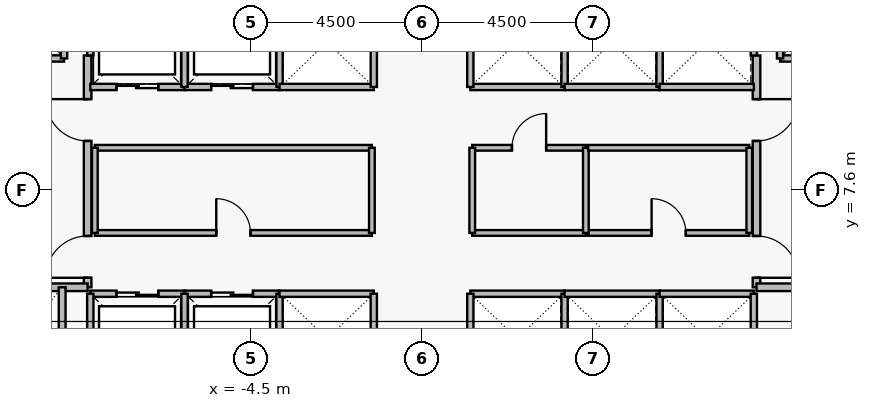
"""IFC4 building model, lengths in metres.
Left out: names, types, materials, properties, quantities, classifications, styles, units other than length and angle.
Written with IfcOpenShell. Run it as: python <this file> out.ifc"""

import sys

from ifc_helpers import new_model, si_unit, direction, frame, frame_2d, origin, place, context, subcontext, project, spatial, rectangle, extrude, element, fill, save


model = new_model("IFC4")
c1 = context("Model", 3, precision=1e-05, world=origin(), true_north=direction((0.0, 1.0)))
c2 = subcontext(c1, "Body", "Model", "MODEL_VIEW")
j1 = project(units=[si_unit("LENGTHUNIT", "METRE"), si_unit("PLANEANGLEUNIT", "RADIAN")], contexts=[c1])
p1 = place(None, origin())
s1 = spatial("IfcSite", under=j1, at=p1, CompositionType="ELEMENT")
p2 = place(p1, origin())
s2 = spatial("IfcBuilding", under=s1, at=p2, CompositionType="ELEMENT")
p3 = place(p2, frame((0.0, 0.0, 121.2)))
s3 = spatial("IfcBuildingStorey", under=s2, at=p3, CompositionType="ELEMENT", Elevation=121.2)
p4 = place(p3, frame((-8.8, 5.05, 0.0), z_axis=(0.0, 0.0, 1.0), x_axis=(0.0, 1.0, 0.0)))
e1 = element("IfcWall", 1, at=p4, inside=s3, PredefinedType="PARTITIONING", context=c2, shape_type="SweptSolid", body=[
    extrude(rectangle(XDim=6.1, YDim=0.2, at=frame_2d((3.05, 0.0))), origin(), (0.0, 0.0, 1.0), 3.43),
])
p5 = place(p4, frame((0.25, 0.0, 0.0)))
e2 = element("IfcOpeningElement", 2, at=p5, cuts=e1, PredefinedType="OPENING", context=c2, shape_type="SweptSolid", body=[
    extrude(rectangle(XDim=1.1, YDim=2.2, at=frame_2d((0.55, 1.1))), frame((0.0, 0.11, 0.0), z_axis=(0.0, -1.0, 0.0), x_axis=(1.0, 0.0, 0.0)), (0.0, 0.0, 1.0), 0.22),
])
p6 = place(p4, frame((3.85, 0.0, 0.0)))
e3 = element("IfcOpeningElement", 3, at=p6, cuts=e1, PredefinedType="OPENING", context=c2, shape_type="SweptSolid", body=[
    extrude(rectangle(XDim=1.1, YDim=2.2, at=frame_2d((0.55, 1.1))), frame((0.0, 0.11, 0.0), z_axis=(0.0, -1.0, 0.0), x_axis=(1.0, 0.0, 0.0)), (0.0, 0.0, 1.0), 0.22),
])
p7 = place(p3, frame((8.8, 11.15, 0.0), z_axis=(0.0, 0.0, 1.0), x_axis=(0.0, -1.0, 0.0)))
e4 = element("IfcWall", 4, at=p7, inside=s3, PredefinedType="PARTITIONING", context=c2, shape_type="SweptSolid", body=[
    extrude(rectangle(XDim=6.1, YDim=0.2, at=frame_2d((3.05, 0.0))), origin(), (0.0, 0.0, 1.0), 3.43),
])
p8 = place(p7, frame((1.15, 0.0, 0.0)))
e5 = element("IfcOpeningElement", 5, at=p8, cuts=e4, PredefinedType="OPENING", context=c2, shape_type="SweptSolid", body=[
    extrude(rectangle(XDim=1.1, YDim=2.2, at=frame_2d((0.55, 1.1))), frame((0.0, 0.11, 0.0), z_axis=(0.0, -1.0, 0.0), x_axis=(1.0, 0.0, 0.0)), (0.0, 0.0, 1.0), 0.22),
])
p9 = place(p7, frame((4.75, 0.0, 0.0)))
e6 = element("IfcOpeningElement", 6, at=p9, cuts=e4, PredefinedType="OPENING", context=c2, shape_type="SweptSolid", body=[
    extrude(rectangle(XDim=1.1, YDim=2.2, at=frame_2d((0.55, 1.1))), frame((0.0, 0.11, 0.0), z_axis=(0.0, -1.0, 0.0), x_axis=(1.0, 0.0, 0.0)), (0.0, 0.0, 1.0), 0.22),
])
p10 = place(p3, frame((-11.58, 11.07, 0.0), z_axis=(0.0, 0.0, 1.0), x_axis=(1.0, 0.0, 0.0)))
e7 = element("IfcWall", 7, at=p10, inside=s3, PredefinedType="PARTITIONING", context=c2, shape_type="SweptSolid", body=[
    extrude(rectangle(XDim=2.16, YDim=0.165, at=frame_2d((1.08, 0.0))), origin(), (0.0, 0.0, 1.0), 3.43),
])
p11 = place(p10, frame((0.53, 0.0, 0.0)))
e8 = element("IfcOpeningElement", 8, at=p11, cuts=e7, PredefinedType="OPENING", context=c2, shape_type="SweptSolid", body=[
    extrude(rectangle(XDim=1.15, YDim=2.25, at=frame_2d((0.575, 1.125))), frame((0.0, 0.093, 0.0), z_axis=(0.0, -1.0, 0.0), x_axis=(1.0, 0.0, 0.0)), (0.0, 0.0, 1.0), 0.185),
])
p12 = place(p3, frame((9.42, 11.07, 0.0), z_axis=(0.0, 0.0, 1.0), x_axis=(1.0, 0.0, 0.0)))
e9 = element("IfcWall", 9, at=p12, inside=s3, PredefinedType="PARTITIONING", context=c2, shape_type="SweptSolid", body=[
    extrude(rectangle(XDim=2.16, YDim=0.165, at=frame_2d((1.08, 0.0))), origin(), (0.0, 0.0, 1.0), 3.43),
])
p13 = place(p12, frame((0.53, 0.0, 0.0)))
e10 = element("IfcOpeningElement", 10, at=p13, cuts=e9, PredefinedType="OPENING", context=c2, shape_type="SweptSolid", body=[
    extrude(rectangle(XDim=1.15, YDim=2.25, at=frame_2d((0.575, 1.125))), frame((0.0, 0.093, 0.0), z_axis=(0.0, -1.0, 0.0), x_axis=(1.0, 0.0, 0.0)), (0.0, 0.0, 1.0), 0.185),
])
p14 = place(p3, frame((-8.73, 4.88, 0.0), z_axis=(0.0, 0.0, 1.0), x_axis=(1.0, 0.0, 0.0)))
e11 = element("IfcWall", 11, at=p14, inside=s3, PredefinedType="PARTITIONING", context=c2, shape_type="SweptSolid", body=[
    extrude(rectangle(XDim=2.48, YDim=0.165, at=frame_2d((1.24, 0.0))), origin(), (0.0, 0.0, 1.0), 3.43),
])
p15 = place(p14, frame((0.69, 0.0, 0.0)))
e12 = element("IfcOpeningElement", 12, at=p15, cuts=e11, PredefinedType="OPENING", context=c2, shape_type="SweptSolid", body=[
    extrude(rectangle(XDim=1.1, YDim=2.25, at=frame_2d((0.55, 1.125))), frame((0.0, 0.093, 0.0), z_axis=(0.0, -1.0, 0.0), x_axis=(1.0, 0.0, 0.0)), (0.0, 0.0, 1.0), 0.185),
])
p16 = place(p3, frame((-6.25, 4.88, 0.0), z_axis=(0.0, 0.0, 1.0), x_axis=(1.0, 0.0, 0.0)))
e13 = element("IfcWall", 13, at=p16, inside=s3, PredefinedType="PARTITIONING", context=c2, shape_type="SweptSolid", body=[
    extrude(rectangle(XDim=2.5, YDim=0.165, at=frame_2d((1.25, 0.0))), origin(), (0.0, 0.0, 1.0), 3.43),
])
p17 = place(p16, frame((0.7, 0.0, 0.0)))
e14 = element("IfcOpeningElement", 14, at=p17, cuts=e13, PredefinedType="OPENING", context=c2, shape_type="SweptSolid", body=[
    extrude(rectangle(XDim=1.1, YDim=2.25, at=frame_2d((0.55, 1.125))), frame((0.0, 0.093, 0.0), z_axis=(0.0, -1.0, 0.0), x_axis=(1.0, 0.0, 0.0)), (0.0, 0.0, 1.0), 0.185),
])
p18 = place(p3, frame((-8.73, 10.32, 0.0), z_axis=(0.0, 0.0, 1.0), x_axis=(1.0, 0.0, 0.0)))
e15 = element("IfcWall", 15, at=p18, inside=s3, PredefinedType="PARTITIONING", context=c2, shape_type="SweptSolid", body=[
    extrude(rectangle(XDim=2.48, YDim=0.165, at=frame_2d((1.24, 0.0))), origin(), (0.0, 0.0, 1.0), 3.43),
])
p19 = place(p18, frame((0.69, 0.0, 0.0)))
e16 = element("IfcOpeningElement", 16, at=p19, cuts=e15, PredefinedType="OPENING", context=c2, shape_type="SweptSolid", body=[
    extrude(rectangle(XDim=1.1, YDim=2.25, at=frame_2d((0.55, 1.125))), frame((0.0, 0.093, 0.0), z_axis=(0.0, -1.0, 0.0), x_axis=(1.0, 0.0, 0.0)), (0.0, 0.0, 1.0), 0.185),
])
p20 = place(p3, frame((-6.25, 10.32, 0.0), z_axis=(0.0, 0.0, 1.0), x_axis=(1.0, 0.0, 0.0)))
e17 = element("IfcWall", 17, at=p20, inside=s3, PredefinedType="PARTITIONING", context=c2, shape_type="SweptSolid", body=[
    extrude(rectangle(XDim=2.5, YDim=0.165, at=frame_2d((1.25, 0.0))), origin(), (0.0, 0.0, 1.0), 3.43),
])
p21 = place(p20, frame((0.7, 0.0, 0.0)))
e18 = element("IfcOpeningElement", 18, at=p21, cuts=e17, PredefinedType="OPENING", context=c2, shape_type="SweptSolid", body=[
    extrude(rectangle(XDim=1.1, YDim=2.25, at=frame_2d((0.55, 1.125))), frame((0.0, 0.093, 0.0), z_axis=(0.0, -1.0, 0.0), x_axis=(1.0, 0.0, 0.0)), (0.0, 0.0, 1.0), 0.185),
])
p22 = place(p3, frame((-8.61, 6.48, 0.0), z_axis=(0.0, 0.0, 1.0), x_axis=(1.0, 0.0, 0.0)))
e19 = element("IfcWall", 19, at=p22, inside=s3, PredefinedType="PARTITIONING", context=c2, shape_type="SweptSolid", body=[
    extrude(rectangle(XDim=7.29, YDim=0.15, at=frame_2d((3.645, 0.0))), origin(), (0.0, 0.0, 1.0), 3.43),
])
p23 = place(p22, frame((3.195, 0.0, 0.0)))
e20 = element("IfcOpeningElement", 20, at=p23, cuts=e19, PredefinedType="OPENING", context=c2, shape_type="SweptSolid", body=[
    extrude(rectangle(XDim=0.9, YDim=2.15, at=frame_2d((0.45, 1.075))), frame((0.0, 0.085, 0.0), z_axis=(0.0, -1.0, 0.0), x_axis=(1.0, 0.0, 0.0)), (0.0, 0.0, 1.0), 0.17),
])
p24 = place(p3, frame((1.32, 8.72, 0.0), z_axis=(0.0, 0.0, 1.0), x_axis=(1.0, 0.0, 0.0)))
e21 = element("IfcWall", 21, at=p24, inside=s3, PredefinedType="PARTITIONING", context=c2, shape_type="SweptSolid", body=[
    extrude(rectangle(XDim=2.99, YDim=0.15, at=frame_2d((1.495, 0.0))), origin(), (0.0, 0.0, 1.0), 3.43),
])
p25 = place(p24, frame((1.045, 0.0, 0.0)))
e22 = element("IfcOpeningElement", 22, at=p25, cuts=e21, PredefinedType="OPENING", context=c2, shape_type="SweptSolid", body=[
    extrude(rectangle(XDim=0.9, YDim=2.15, at=frame_2d((0.45, 1.075))), frame((0.0, 0.085, 0.0), z_axis=(0.0, -1.0, 0.0), x_axis=(1.0, 0.0, 0.0)), (0.0, 0.0, 1.0), 0.17),
])
p26 = place(p3, frame((4.37, 6.48, 0.0), z_axis=(0.0, 0.0, 1.0), x_axis=(1.0, 0.0, 0.0)))
e23 = element("IfcWall", 23, at=p26, inside=s3, PredefinedType="PARTITIONING", context=c2, shape_type="SweptSolid", body=[
    extrude(rectangle(XDim=4.24, YDim=0.15, at=frame_2d((2.12, 0.0))), origin(), (0.0, 0.0, 1.0), 3.43),
])
p27 = place(p26, frame((1.67, 0.0, 0.0)))
e24 = element("IfcOpeningElement", 24, at=p27, cuts=e23, PredefinedType="OPENING", context=c2, shape_type="SweptSolid", body=[
    extrude(rectangle(XDim=0.9, YDim=2.15, at=frame_2d((0.45, 1.075))), frame((0.0, 0.085, 0.0), z_axis=(0.0, -1.0, 0.0), x_axis=(1.0, 0.0, 0.0)), (0.0, 0.0, 1.0), 0.17),
])
for number, where, z_axis, x_axis in (
    (25, (-11.65, 5.05, 0.0), (0.0, 0.0, 1.0), (1.0, 0.0, 0.0)),
    (26, (8.8, 5.05, 0.0), (0.0, 0.0, 1.0), (1.0, 0.0, 0.0)),
):
    element("IfcWall", number, at=place(p3, frame(where, z_axis=z_axis, x_axis=x_axis)), inside=s3, PredefinedType="PARTITIONING", context=c2, shape_type="SweptSolid", body=[
        extrude(rectangle(XDim=2.85, YDim=0.2, at=frame_2d((1.425, 0.0))), origin(), (0.0, 0.0, 1.0), 3.43),
    ])
for number, where, z_axis, x_axis in (
    (27, (-9.42, 11.07, 0.0), (0.0, 0.0, 1.0), (0.0, 1.0, 0.0)),
    (28, (9.42, 11.07, 0.0), (0.0, 0.0, 1.0), (0.0, 1.0, 0.0)),
):
    element("IfcWall", number, at=place(p3, frame(where, z_axis=z_axis, x_axis=x_axis)), inside=s3, PredefinedType="PARTITIONING", context=c2, shape_type="SweptSolid", body=[
        extrude(rectangle(XDim=2.96, YDim=0.165, at=frame_2d((1.48, 0.0))), origin(), (0.0, 0.0, 1.0), 3.43),
    ])
for number, where, z_axis, x_axis in (
    (29, (-8.73, 2.52, 0.0), (0.0, 0.0, 1.0), (0.0, 1.0, 0.0)),
    (30, (-6.25, 2.52, 0.0), (0.0, 0.0, 1.0), (0.0, 1.0, 0.0)),
    (31, (-3.75, 2.52, 0.0), (0.0, 0.0, 1.0), (0.0, 1.0, 0.0)),
):
    element("IfcWall", number, at=place(p3, frame(where, z_axis=z_axis, x_axis=x_axis)), inside=s3, PredefinedType="PARTITIONING", context=c2, shape_type="SweptSolid", body=[
        extrude(rectangle(XDim=2.36, YDim=0.165, at=frame_2d((1.18, 0.0))), origin(), (0.0, 0.0, 1.0), 3.43),
    ])
p28 = place(p3, frame((-8.73, 11.15, 0.0), z_axis=(0.0, 0.0, 1.0), x_axis=(0.0, 1.0, 0.0)))
e32 = element("IfcWall", 32, at=p28, inside=s3, PredefinedType="PARTITIONING", context=c2, shape_type="SweptSolid", body=[
    extrude(rectangle(XDim=1.53, YDim=0.165, at=frame_2d((0.765, 0.0))), origin(), (0.0, 0.0, 1.0), 3.43),
])
for number, where, z_axis, x_axis in (
    (33, (-6.25, 10.32, 0.0), (0.0, 0.0, 1.0), (0.0, 1.0, 0.0)),
    (34, (-3.75, 10.32, 0.0), (0.0, 0.0, 1.0), (0.0, 1.0, 0.0)),
):
    element("IfcWall", number, at=place(p3, frame(where, z_axis=z_axis, x_axis=x_axis)), inside=s3, PredefinedType="PARTITIONING", context=c2, shape_type="SweptSolid", body=[
        extrude(rectangle(XDim=2.36, YDim=0.165, at=frame_2d((1.18, 0.0))), origin(), (0.0, 0.0, 1.0), 3.43),
    ])
p29 = place(p3, frame((-3.75, 4.88, 0.0), z_axis=(0.0, 0.0, 1.0), x_axis=(1.0, 0.0, 0.0)))
e35 = element("IfcWall", 35, at=p29, inside=s3, PredefinedType="PARTITIONING", context=c2, shape_type="SweptSolid", body=[
    extrude(rectangle(XDim=2.48, YDim=0.165, at=frame_2d((1.24, 0.0))), origin(), (0.0, 0.0, 1.0), 3.43),
])
p30 = place(p3, frame((-1.27, 2.52, 0.0), z_axis=(0.0, 0.0, 1.0), x_axis=(0.0, 1.0, 0.0)))
e36 = element("IfcWall", 36, at=p30, inside=s3, PredefinedType="PARTITIONING", context=c2, shape_type="SweptSolid", body=[
    extrude(rectangle(XDim=2.36, YDim=0.165, at=frame_2d((1.18, 0.0))), origin(), (0.0, 0.0, 1.0), 3.43),
])
p31 = place(p3, frame((1.27, 4.88, 0.0), z_axis=(0.0, 0.0, 1.0), x_axis=(1.0, 0.0, 0.0)))
e37 = element("IfcWall", 37, at=p31, inside=s3, PredefinedType="PARTITIONING", context=c2, shape_type="SweptSolid", body=[
    extrude(rectangle(XDim=2.48, YDim=0.165, at=frame_2d((1.24, 0.0))), origin(), (0.0, 0.0, 1.0), 3.43),
])
for number, where, z_axis, x_axis in (
    (38, (1.27, 2.52, 0.0), (0.0, 0.0, 1.0), (0.0, 1.0, 0.0)),
    (39, (3.75, 2.52, 0.0), (0.0, 0.0, 1.0), (0.0, 1.0, 0.0)),
):
    element("IfcWall", number, at=place(p3, frame(where, z_axis=z_axis, x_axis=x_axis)), inside=s3, PredefinedType="PARTITIONING", context=c2, shape_type="SweptSolid", body=[
        extrude(rectangle(XDim=2.36, YDim=0.165, at=frame_2d((1.18, 0.0))), origin(), (0.0, 0.0, 1.0), 3.43),
    ])
p32 = place(p3, frame((-3.75, 10.32, 0.0), z_axis=(0.0, 0.0, 1.0), x_axis=(1.0, 0.0, 0.0)))
e40 = element("IfcWall", 40, at=p32, inside=s3, PredefinedType="PARTITIONING", context=c2, shape_type="SweptSolid", body=[
    extrude(rectangle(XDim=2.48, YDim=0.165, at=frame_2d((1.24, 0.0))), origin(), (0.0, 0.0, 1.0), 3.43),
])
p33 = place(p3, frame((-1.27, 10.32, 0.0), z_axis=(0.0, 0.0, 1.0), x_axis=(0.0, 1.0, 0.0)))
e41 = element("IfcWall", 41, at=p33, inside=s3, PredefinedType="PARTITIONING", context=c2, shape_type="SweptSolid", body=[
    extrude(rectangle(XDim=2.36, YDim=0.165, at=frame_2d((1.18, 0.0))), origin(), (0.0, 0.0, 1.0), 3.43),
])
p34 = place(p3, frame((1.27, 10.32, 0.0), z_axis=(0.0, 0.0, 1.0), x_axis=(1.0, 0.0, 0.0)))
e42 = element("IfcWall", 42, at=p34, inside=s3, PredefinedType="PARTITIONING", context=c2, shape_type="SweptSolid", body=[
    extrude(rectangle(XDim=2.48, YDim=0.165, at=frame_2d((1.24, 0.0))), origin(), (0.0, 0.0, 1.0), 3.43),
])
for number, where, z_axis, x_axis in (
    (43, (1.27, 10.32, 0.0), (0.0, 0.0, 1.0), (0.0, 1.0, 0.0)),
    (44, (3.75, 10.32, 0.0), (0.0, 0.0, 1.0), (0.0, 1.0, 0.0)),
):
    element("IfcWall", number, at=place(p3, frame(where, z_axis=z_axis, x_axis=x_axis)), inside=s3, PredefinedType="PARTITIONING", context=c2, shape_type="SweptSolid", body=[
        extrude(rectangle(XDim=2.36, YDim=0.165, at=frame_2d((1.18, 0.0))), origin(), (0.0, 0.0, 1.0), 3.43),
    ])
p35 = place(p3, frame((3.75, 4.88, 0.0), z_axis=(0.0, 0.0, 1.0), x_axis=(1.0, 0.0, 0.0)))
e45 = element("IfcWall", 45, at=p35, inside=s3, PredefinedType="PARTITIONING", context=c2, shape_type="SweptSolid", body=[
    extrude(rectangle(XDim=2.5, YDim=0.165, at=frame_2d((1.25, 0.0))), origin(), (0.0, 0.0, 1.0), 3.43),
])
p36 = place(p3, frame((6.25, 2.52, 0.0), z_axis=(0.0, 0.0, 1.0), x_axis=(0.0, 1.0, 0.0)))
e46 = element("IfcWall", 46, at=p36, inside=s3, PredefinedType="PARTITIONING", context=c2, shape_type="SweptSolid", body=[
    extrude(rectangle(XDim=2.36, YDim=0.165, at=frame_2d((1.18, 0.0))), origin(), (0.0, 0.0, 1.0), 3.43),
])
p37 = place(p3, frame((6.25, 4.88, 0.0), z_axis=(0.0, 0.0, 1.0), x_axis=(1.0, 0.0, 0.0)))
e47 = element("IfcWall", 47, at=p37, inside=s3, PredefinedType="PARTITIONING", context=c2, shape_type="SweptSolid", body=[
    extrude(rectangle(XDim=2.48, YDim=0.165, at=frame_2d((1.24, 0.0))), origin(), (0.0, 0.0, 1.0), 3.43),
])
p38 = place(p3, frame((8.73, 2.52, 0.0), z_axis=(0.0, 0.0, 1.0), x_axis=(0.0, 1.0, 0.0)))
e48 = element("IfcWall", 48, at=p38, inside=s3, PredefinedType="PARTITIONING", context=c2, shape_type="SweptSolid", body=[
    extrude(rectangle(XDim=2.36, YDim=0.165, at=frame_2d((1.18, 0.0))), origin(), (0.0, 0.0, 1.0), 3.43),
])
p39 = place(p3, frame((3.75, 10.32, 0.0), z_axis=(0.0, 0.0, 1.0), x_axis=(1.0, 0.0, 0.0)))
e49 = element("IfcWall", 49, at=p39, inside=s3, PredefinedType="PARTITIONING", context=c2, shape_type="SweptSolid", body=[
    extrude(rectangle(XDim=2.5, YDim=0.165, at=frame_2d((1.25, 0.0))), origin(), (0.0, 0.0, 1.0), 3.43),
])
p40 = place(p3, frame((6.25, 10.32, 0.0), z_axis=(0.0, 0.0, 1.0), x_axis=(0.0, 1.0, 0.0)))
e50 = element("IfcWall", 50, at=p40, inside=s3, PredefinedType="PARTITIONING", context=c2, shape_type="SweptSolid", body=[
    extrude(rectangle(XDim=2.36, YDim=0.165, at=frame_2d((1.18, 0.0))), origin(), (0.0, 0.0, 1.0), 3.43),
])
p41 = place(p3, frame((6.25, 10.32, 0.0), z_axis=(0.0, 0.0, 1.0), x_axis=(1.0, 0.0, 0.0)))
e51 = element("IfcWall", 51, at=p41, inside=s3, PredefinedType="PARTITIONING", context=c2, shape_type="SweptSolid", body=[
    extrude(rectangle(XDim=2.48, YDim=0.165, at=frame_2d((1.24, 0.0))), origin(), (0.0, 0.0, 1.0), 3.43),
])
p42 = place(p3, frame((8.73, 11.15, 0.0), z_axis=(0.0, 0.0, 1.0), x_axis=(0.0, 1.0, 0.0)))
e52 = element("IfcWall", 52, at=p42, inside=s3, PredefinedType="PARTITIONING", context=c2, shape_type="SweptSolid", body=[
    extrude(rectangle(XDim=1.53, YDim=0.165, at=frame_2d((0.765, 0.0))), origin(), (0.0, 0.0, 1.0), 3.43),
])
p43 = place(p3, frame((-9.47, 2.45, 0.0), z_axis=(0.0, 0.0, 1.0), x_axis=(0.0, 1.0, 0.0)))
e53 = element("IfcWall", 53, at=p43, inside=s3, PredefinedType="PARTITIONING", context=c2, shape_type="SweptSolid", body=[
    extrude(rectangle(XDim=2.6, YDim=0.18, at=frame_2d((1.3, 0.0))), origin(), (0.0, 0.0, 1.0), 3.43),
])
p44 = place(p3, frame((-8.61, 8.72, 0.0), z_axis=(0.0, 0.0, 1.0), x_axis=(1.0, 0.0, 0.0)))
e54 = element("IfcWall", 54, at=p44, inside=s3, PredefinedType="PARTITIONING", context=c2, shape_type="SweptSolid", body=[
    extrude(rectangle(XDim=7.29, YDim=0.15, at=frame_2d((3.645, 0.0))), origin(), (0.0, 0.0, 1.0), 3.43),
])
for number, where, z_axis, x_axis in (
    (55, (-8.61, 6.48, 0.0), (0.0, 0.0, 1.0), (0.0, 1.0, 0.0)),
    (56, (-1.32, 6.48, 0.0), (0.0, 0.0, 1.0), (0.0, 1.0, 0.0)),
):
    element("IfcWall", number, at=place(p3, frame(where, z_axis=z_axis, x_axis=x_axis)), inside=s3, PredefinedType="PARTITIONING", context=c2, shape_type="SweptSolid", body=[
        extrude(rectangle(XDim=2.24, YDim=0.15, at=frame_2d((1.12, 0.0))), origin(), (0.0, 0.0, 1.0), 3.43),
    ])
p45 = place(p3, frame((1.32, 6.48, 0.0), z_axis=(0.0, 0.0, 1.0), x_axis=(1.0, 0.0, 0.0)))
e57 = element("IfcWall", 57, at=p45, inside=s3, PredefinedType="PARTITIONING", context=c2, shape_type="SweptSolid", body=[
    extrude(rectangle(XDim=2.99, YDim=0.15, at=frame_2d((1.495, 0.0))), origin(), (0.0, 0.0, 1.0), 3.43),
])
for number, where, z_axis, x_axis in (
    (58, (1.32, 6.48, 0.0), (0.0, 0.0, 1.0), (0.0, 1.0, 0.0)),
    (59, (4.31, 6.48, 0.0), (0.0, 0.0, 1.0), (0.0, 1.0, 0.0)),
):
    element("IfcWall", number, at=place(p3, frame(where, z_axis=z_axis, x_axis=x_axis)), inside=s3, PredefinedType="PARTITIONING", context=c2, shape_type="SweptSolid", body=[
        extrude(rectangle(XDim=2.24, YDim=0.15, at=frame_2d((1.12, 0.0))), origin(), (0.0, 0.0, 1.0), 3.43),
    ])
p46 = place(p3, frame((4.37, 8.72, 0.0), z_axis=(0.0, 0.0, 1.0), x_axis=(1.0, 0.0, 0.0)))
e60 = element("IfcWall", 60, at=p46, inside=s3, PredefinedType="PARTITIONING", context=c2, shape_type="SweptSolid", body=[
    extrude(rectangle(XDim=4.24, YDim=0.15, at=frame_2d((2.12, 0.0))), origin(), (0.0, 0.0, 1.0), 3.43),
])
p47 = place(p3, frame((8.61, 6.48, 0.0), z_axis=(0.0, 0.0, 1.0), x_axis=(0.0, 1.0, 0.0)))
e61 = element("IfcWall", 61, at=p47, inside=s3, PredefinedType="PARTITIONING", context=c2, shape_type="SweptSolid", body=[
    extrude(rectangle(XDim=2.24, YDim=0.15, at=frame_2d((1.12, 0.0))), origin(), (0.0, 0.0, 1.0), 3.43),
])
p48 = place(p5, origin())
e62 = element("IfcDoor", 62, at=p48, inside=s3, OperationType="SINGLE_SWING_LEFT", PredefinedType="DOOR", context=c2, shape_type="SweptSolid", body=[
    extrude(rectangle(XDim=1.1, YDim=2.2, at=frame_2d((0.55, 1.1))), frame((0.0, 0.025, 0.0), z_axis=(0.0, -1.0, 0.0), x_axis=(1.0, 0.0, 0.0)), (0.0, 0.0, 1.0), 0.05),
])
fill(e2, e62)
p49 = place(p6, origin())
e63 = element("IfcDoor", 63, at=p49, inside=s3, OperationType="SINGLE_SWING_RIGHT", PredefinedType="DOOR", context=c2, shape_type="SweptSolid", body=[
    extrude(rectangle(XDim=1.1, YDim=2.2, at=frame_2d((0.55, 1.1))), frame((0.0, 0.025, 0.0), z_axis=(0.0, -1.0, 0.0), x_axis=(1.0, 0.0, 0.0)), (0.0, 0.0, 1.0), 0.05),
])
fill(e3, e63)
p50 = place(p8, origin())
e64 = element("IfcDoor", 64, at=p50, inside=s3, OperationType="SINGLE_SWING_LEFT", PredefinedType="DOOR", context=c2, shape_type="SweptSolid", body=[
    extrude(rectangle(XDim=1.1, YDim=2.2, at=frame_2d((0.55, 1.1))), frame((0.0, 0.025, 0.0), z_axis=(0.0, -1.0, 0.0), x_axis=(1.0, 0.0, 0.0)), (0.0, 0.0, 1.0), 0.05),
])
fill(e5, e64)
p51 = place(p9, origin())
e65 = element("IfcDoor", 65, at=p51, inside=s3, OperationType="SINGLE_SWING_RIGHT", PredefinedType="DOOR", context=c2, shape_type="SweptSolid", body=[
    extrude(rectangle(XDim=1.1, YDim=2.2, at=frame_2d((0.55, 1.1))), frame((0.0, 0.025, 0.0), z_axis=(0.0, -1.0, 0.0), x_axis=(1.0, 0.0, 0.0)), (0.0, 0.0, 1.0), 0.05),
])
fill(e6, e65)
p52 = place(p15, origin())
e66 = element("IfcDoor", 66, at=p52, inside=s3, OperationType="SLIDING_TO_LEFT", PredefinedType="DOOR", context=c2, shape_type="SweptSolid", body=[
    extrude(rectangle(XDim=1.1, YDim=2.25, at=frame_2d((0.55, 1.125))), frame((0.0, 0.025, 0.0), z_axis=(0.0, -1.0, 0.0), x_axis=(1.0, 0.0, 0.0)), (0.0, 0.0, 1.0), 0.05),
])
fill(e12, e66)
p53 = place(p17, origin())
e67 = element("IfcDoor", 67, at=p53, inside=s3, OperationType="SLIDING_TO_LEFT", PredefinedType="DOOR", context=c2, shape_type="SweptSolid", body=[
    extrude(rectangle(XDim=1.1, YDim=2.25, at=frame_2d((0.55, 1.125))), frame((0.0, 0.025, 0.0), z_axis=(0.0, -1.0, 0.0), x_axis=(1.0, 0.0, 0.0)), (0.0, 0.0, 1.0), 0.05),
])
fill(e14, e67)
p54 = place(p19, origin())
e68 = element("IfcDoor", 68, at=p54, inside=s3, OperationType="SLIDING_TO_LEFT", PredefinedType="DOOR", context=c2, shape_type="SweptSolid", body=[
    extrude(rectangle(XDim=1.1, YDim=2.25, at=frame_2d((0.55, 1.125))), frame((0.0, 0.025, 0.0), z_axis=(0.0, -1.0, 0.0), x_axis=(1.0, 0.0, 0.0)), (0.0, 0.0, 1.0), 0.05),
])
fill(e16, e68)
p55 = place(p21, origin())
e69 = element("IfcDoor", 69, at=p55, inside=s3, OperationType="SLIDING_TO_LEFT", PredefinedType="DOOR", context=c2, shape_type="SweptSolid", body=[
    extrude(rectangle(XDim=1.1, YDim=2.25, at=frame_2d((0.55, 1.125))), frame((0.0, 0.025, 0.0), z_axis=(0.0, -1.0, 0.0), x_axis=(1.0, 0.0, 0.0)), (0.0, 0.0, 1.0), 0.05),
])
fill(e18, e69)
p56 = place(p23, origin())
e70 = element("IfcDoor", 70, at=p56, inside=s3, OperationType="SINGLE_SWING_LEFT", PredefinedType="DOOR", context=c2, shape_type="SweptSolid", body=[
    extrude(rectangle(XDim=0.9, YDim=2.15, at=frame_2d((0.45, 1.075))), frame((0.0, 0.025, 0.0), z_axis=(0.0, -1.0, 0.0), x_axis=(1.0, 0.0, 0.0)), (0.0, 0.0, 1.0), 0.05),
])
fill(e20, e70)
p57 = place(p25, origin())
e71 = element("IfcDoor", 71, at=p57, inside=s3, OperationType="SINGLE_SWING_RIGHT", PredefinedType="DOOR", context=c2, shape_type="SweptSolid", body=[
    extrude(rectangle(XDim=0.9, YDim=2.15, at=frame_2d((0.45, 1.075))), frame((0.0, 0.025, 0.0), z_axis=(0.0, -1.0, 0.0), x_axis=(1.0, 0.0, 0.0)), (0.0, 0.0, 1.0), 0.05),
])
fill(e22, e71)
p58 = place(p27, origin())
e72 = element("IfcDoor", 72, at=p58, inside=s3, OperationType="SINGLE_SWING_LEFT", PredefinedType="DOOR", context=c2, shape_type="SweptSolid", body=[
    extrude(rectangle(XDim=0.9, YDim=2.15, at=frame_2d((0.45, 1.075))), frame((0.0, 0.025, 0.0), z_axis=(0.0, -1.0, 0.0), x_axis=(1.0, 0.0, 0.0)), (0.0, 0.0, 1.0), 0.05),
])
fill(e24, e72)
save(model, sys.argv[1])
